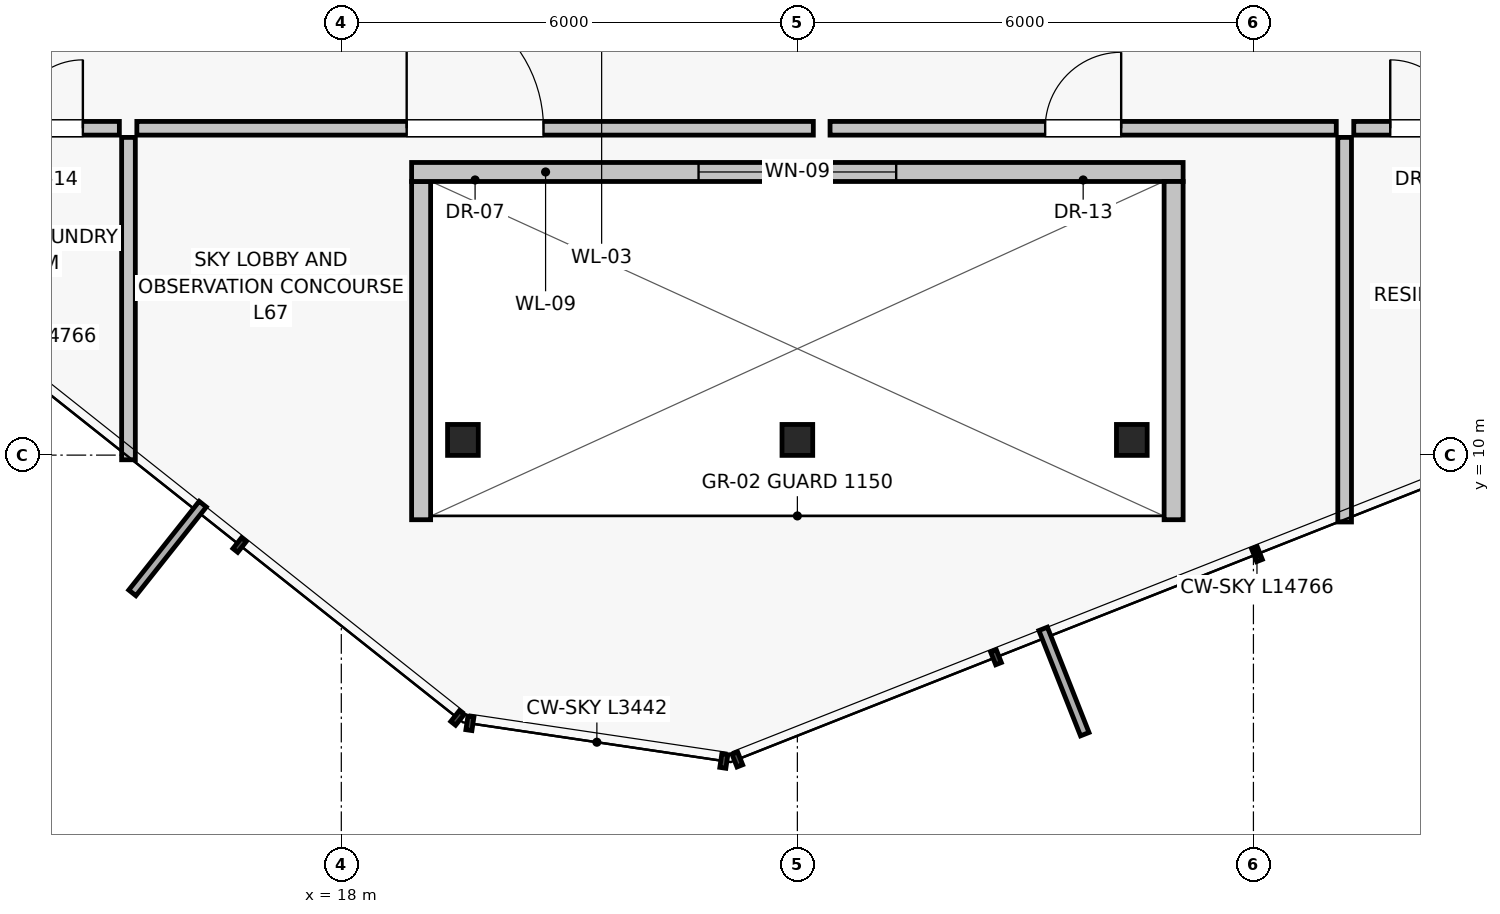
"""IFC4 building model, lengths in metres.
Left out: names, types, materials, properties, quantities, classifications, styles, units other than length and angle.
Written with IfcOpenShell. Run it as: python <this file> out.ifc"""

import sys

from ifc_helpers import new_model, si_unit, direction, frame, frame_2d, origin, origin_2d, place, context, subcontext, project, spatial, rectangle, i_section, extrude, source, transform, mapped, element, fill, save


model = new_model("IFC4")
c1 = context("Model", 3, precision=1e-05, world=origin(), true_north=direction((0.0, 1.0)))
c2 = subcontext(c1, "Body", "Model", "MODEL_VIEW")
j1 = project(units=[si_unit("LENGTHUNIT", "METRE"), si_unit("PLANEANGLEUNIT", "RADIAN")], contexts=[c1])
p1 = place(None, origin())
s1 = spatial("IfcSite", under=j1, at=p1, CompositionType="ELEMENT")
p2 = place(p1, origin())
s2 = spatial("IfcBuilding", under=s1, at=p2, CompositionType="ELEMENT")
p3 = place(p2, frame((0.0, 0.0, 236.55)))
s3 = spatial("IfcBuildingStorey", under=s2, at=p3, CompositionType="ELEMENT", Elevation=236.55)
for number, where, z_axis, x_axis in (
    (1, (19.6, 10.2, 0.0), (0.0, 0.0, 1.0), (1.0, 0.0, 0.0)),
    (2, (24.0, 10.2, 0.0), (0.0, 0.0, 1.0), (1.0, 0.0, 0.0)),
    (3, (28.4, 10.2, 0.0), (0.0, 0.0, 1.0), (1.0, 0.0, 0.0)),
):
    element("IfcColumn", number, at=place(p3, frame(where, z_axis=z_axis, x_axis=x_axis)), inside=s3, PredefinedType="COLUMN", context=c2, shape_type="SweptSolid", body=[
        extrude(i_section(OverallWidth=0.404, OverallDepth=0.407, WebThickness=0.025, FlangeThickness=0.04, at=origin_2d()), origin(), (0.0, 0.0, 1.0), 4.1),
    ])
p4 = place(p3, frame((19.05, 9.15, 0.0), z_axis=(0.0, 0.0, 1.0), x_axis=(0.0, 1.0, 0.0)))
e4 = element("IfcWall", 4, at=p4, inside=s3, PredefinedType="SOLIDWALL", context=c2, shape_type="SweptSolid", body=[
    extrude(rectangle(XDim=4.45, YDim=0.25, at=frame_2d((2.225, 0.0))), origin(), (0.0, 0.0, 1.0), 3.393),
])
p5 = place(p3, frame((18.925, 13.725, 0.0), z_axis=(0.0, 0.0, 1.0), x_axis=(1.0, 0.0, 0.0)))
e5 = element("IfcWall", 5, at=p5, inside=s3, PredefinedType="SOLIDWALL", context=c2, shape_type="SweptSolid", body=[
    extrude(rectangle(XDim=10.15, YDim=0.25, at=frame_2d((5.075, 0.0))), origin(), (0.0, 0.0, 1.0), 3.512),
])
p6 = place(p5, frame((3.775, 0.0, 0.7)))
e6 = element("IfcOpeningElement", 6, at=p6, cuts=e5, PredefinedType="OPENING", context=c2, shape_type="SweptSolid", body=[
    extrude(rectangle(XDim=2.6, YDim=2.1, at=frame_2d((1.3, 1.05))), frame((0.0, 0.135, 0.0), z_axis=(0.0, -1.0, 0.0), x_axis=(1.0, 0.0, 0.0)), (0.0, 0.0, 1.0), 0.27),
])
p7 = place(p3, frame((28.95, 13.6, 0.0), z_axis=(0.0, 0.0, 1.0), x_axis=(0.0, -1.0, 0.0)))
e7 = element("IfcWall", 7, at=p7, inside=s3, PredefinedType="SOLIDWALL", context=c2, shape_type="SweptSolid", body=[
    extrude(rectangle(XDim=4.45, YDim=0.25, at=frame_2d((2.225, 0.0))), origin(), (0.0, 0.0, 1.0), 3.865),
])
p8 = place(p3, frame((15.2, 14.18, 0.0), z_axis=(0.0, 0.0, 1.0), x_axis=(0.0, -1.0, 0.0)))
e8 = element("IfcWall", 8, at=p8, inside=s3, PredefinedType="PARTITIONING", context=c2, shape_type="SweptSolid", body=[
    extrude(rectangle(XDim=4.241, YDim=0.18, at=frame_2d((2.121, 0.0))), origin(), (0.0, 0.0, 1.0), 3.865),
])
p9 = place(p3, frame((31.2, 14.18, 0.0), z_axis=(0.0, 0.0, 1.0), x_axis=(0.0, -1.0, 0.0)))
e9 = element("IfcWall", 9, at=p9, inside=s3, PredefinedType="PARTITIONING", context=c2, shape_type="SweptSolid", body=[
    extrude(rectangle(XDim=5.06, YDim=0.18, at=frame_2d((2.53, 0.0))), origin(), (0.0, 0.0, 1.0), 3.865),
])
p10 = place(p3, frame((15.31, 14.3, 0.0), z_axis=(0.0, 0.0, 1.0), x_axis=(1.0, 0.0, 0.0)))
e10 = element("IfcWall", 10, at=p10, inside=s3, PredefinedType="PARTITIONING", context=c2, shape_type="SweptSolid", body=[
    extrude(rectangle(XDim=8.9, YDim=0.18, at=frame_2d((4.45, 0.0))), origin(), (0.0, 0.0, 1.0), 3.865),
])
p11 = place(p10, frame((3.55, 0.0, 0.0)))
e11 = element("IfcOpeningElement", 11, at=p11, cuts=e10, PredefinedType="OPENING", context=c2, shape_type="SweptSolid", body=[
    extrude(rectangle(XDim=1.8, YDim=2.25, at=frame_2d((0.9, 1.125))), frame((0.0, 0.1, 0.0), z_axis=(0.0, -1.0, 0.0), x_axis=(1.0, 0.0, 0.0)), (0.0, 0.0, 1.0), 0.2),
])
p12 = place(p3, frame((24.43, 14.3, 0.0), z_axis=(0.0, 0.0, 1.0), x_axis=(1.0, 0.0, 0.0)))
e12 = element("IfcWall", 12, at=p12, inside=s3, PredefinedType="PARTITIONING", context=c2, shape_type="SweptSolid", body=[
    extrude(rectangle(XDim=6.66, YDim=0.18, at=frame_2d((3.33, 0.0))), origin(), (0.0, 0.0, 1.0), 3.865),
])
p13 = place(p12, frame((2.83, 0.0, 0.0)))
e13 = element("IfcOpeningElement", 13, at=p13, cuts=e12, PredefinedType="OPENING", context=c2, shape_type="SweptSolid", body=[
    extrude(rectangle(XDim=1.0, YDim=2.01, at=frame_2d((0.5, 1.005))), frame((0.0, 0.1, 0.0), z_axis=(0.0, -1.0, 0.0), x_axis=(1.0, 0.0, 0.0)), (0.0, 0.0, 1.0), 0.2),
])
p14 = place(p3, frame((13.22, 14.3, 0.0), z_axis=(0.0, 0.0, 1.0), x_axis=(1.0, 0.0, 0.0)))
e14 = element("IfcWall", 14, at=p14, inside=s3, PredefinedType="PARTITIONING", context=c2, shape_type="SweptSolid", body=[
    extrude(rectangle(XDim=1.86, YDim=0.18, at=frame_2d((0.93, 0.0))), origin(), (0.0, 0.0, 1.0), 3.865),
])
p15 = place(p14, frame((0.48, 0.0, 0.0)))
e15 = element("IfcOpeningElement", 15, at=p15, cuts=e14, PredefinedType="OPENING", context=c2, shape_type="SweptSolid", body=[
    extrude(rectangle(XDim=0.9, YDim=2.01, at=frame_2d((0.45, 1.005))), frame((0.0, 0.1, 0.0), z_axis=(0.0, -1.0, 0.0), x_axis=(1.0, 0.0, 0.0)), (0.0, 0.0, 1.0), 0.2),
])
p16 = place(p3, frame((31.32, 14.3, 0.0), z_axis=(0.0, 0.0, 1.0), x_axis=(1.0, 0.0, 0.0)))
e16 = element("IfcWall", 16, at=p16, inside=s3, PredefinedType="PARTITIONING", context=c2, shape_type="SweptSolid", body=[
    extrude(rectangle(XDim=1.86, YDim=0.18, at=frame_2d((0.93, 0.0))), origin(), (0.0, 0.0, 1.0), 3.865),
])
p17 = place(p16, frame((0.48, 0.0, 0.0)))
e17 = element("IfcOpeningElement", 17, at=p17, cuts=e16, PredefinedType="OPENING", context=c2, shape_type="SweptSolid", body=[
    extrude(rectangle(XDim=0.9, YDim=2.01, at=frame_2d((0.45, 1.005))), frame((0.0, 0.1, 0.0), z_axis=(0.0, -1.0, 0.0), x_axis=(1.0, 0.0, 0.0)), (0.0, 0.0, 1.0), 0.2),
])
m1 = source(origin(), c2, "Body", "SweptSolid", [
    extrude(rectangle(XDim=2.6, YDim=2.1, at=frame_2d((1.3, 1.05))), frame((0.0, 0.03, 0.0), z_axis=(0.0, -1.0, 0.0), x_axis=(1.0, 0.0, 0.0)), (0.0, 0.0, 1.0), 0.06),
])
p18 = place(p6, origin())
e18 = element("IfcWindow", 18, at=p18, inside=s3, PartitioningType="SINGLE_PANEL", PredefinedType="WINDOW", context=c2, shape_type="MappedRepresentation", body=[
    mapped(m1, transform((0.0, 0.0, 0.0), scale=1.0)),
])
fill(e6, e18)
m2 = source(origin(), c2, "Body", "SweptSolid", [
    extrude(rectangle(XDim=1.8, YDim=2.25, at=frame_2d((0.9, 1.125))), frame((0.0, 0.025, 0.0), z_axis=(0.0, -1.0, 0.0), x_axis=(1.0, 0.0, 0.0)), (0.0, 0.0, 1.0), 0.05),
])
p19 = place(p11, origin())
e19 = element("IfcDoor", 19, at=p19, inside=s3, OperationType="SINGLE_SWING_LEFT", PredefinedType="DOOR", context=c2, shape_type="MappedRepresentation", body=[
    mapped(m2, transform((0.0, 0.0, 0.0), scale=1.0)),
])
fill(e11, e19)
m3 = source(origin(), c2, "Body", "SweptSolid", [
    extrude(rectangle(XDim=1.0, YDim=2.01, at=frame_2d((0.5, 1.005))), frame((0.0, 0.025, 0.0), z_axis=(0.0, -1.0, 0.0), x_axis=(1.0, 0.0, 0.0)), (0.0, 0.0, 1.0), 0.05),
])
p20 = place(p13, origin())
e20 = element("IfcDoor", 20, at=p20, inside=s3, OperationType="SINGLE_SWING_RIGHT", PredefinedType="DOOR", context=c2, shape_type="MappedRepresentation", body=[
    mapped(m3, transform((0.0, 0.0, 0.0), scale=1.0)),
])
fill(e13, e20)
m4 = source(origin(), c2, "Body", "SweptSolid", [
    extrude(rectangle(XDim=0.9, YDim=2.01, at=frame_2d((0.45, 1.005))), frame((0.0, 0.025, 0.0), z_axis=(0.0, -1.0, 0.0), x_axis=(1.0, 0.0, 0.0)), (0.0, 0.0, 1.0), 0.05),
])
p21 = place(p15, origin())
e21 = element("IfcDoor", 21, at=p21, inside=s3, OperationType="SINGLE_SWING_RIGHT", PredefinedType="DOOR", context=c2, shape_type="MappedRepresentation", body=[
    mapped(m4, transform((0.0, 0.0, 0.0), scale=1.0)),
])
fill(e15, e21)
p22 = place(p17, origin())
e22 = element("IfcDoor", 22, at=p22, inside=s3, OperationType="SINGLE_SWING_LEFT", PredefinedType="DOOR", context=c2, shape_type="MappedRepresentation", body=[
    mapped(m4, transform((0.0, 0.0, 0.0), scale=1.0)),
])
fill(e17, e22)
save(model, sys.argv[1])
